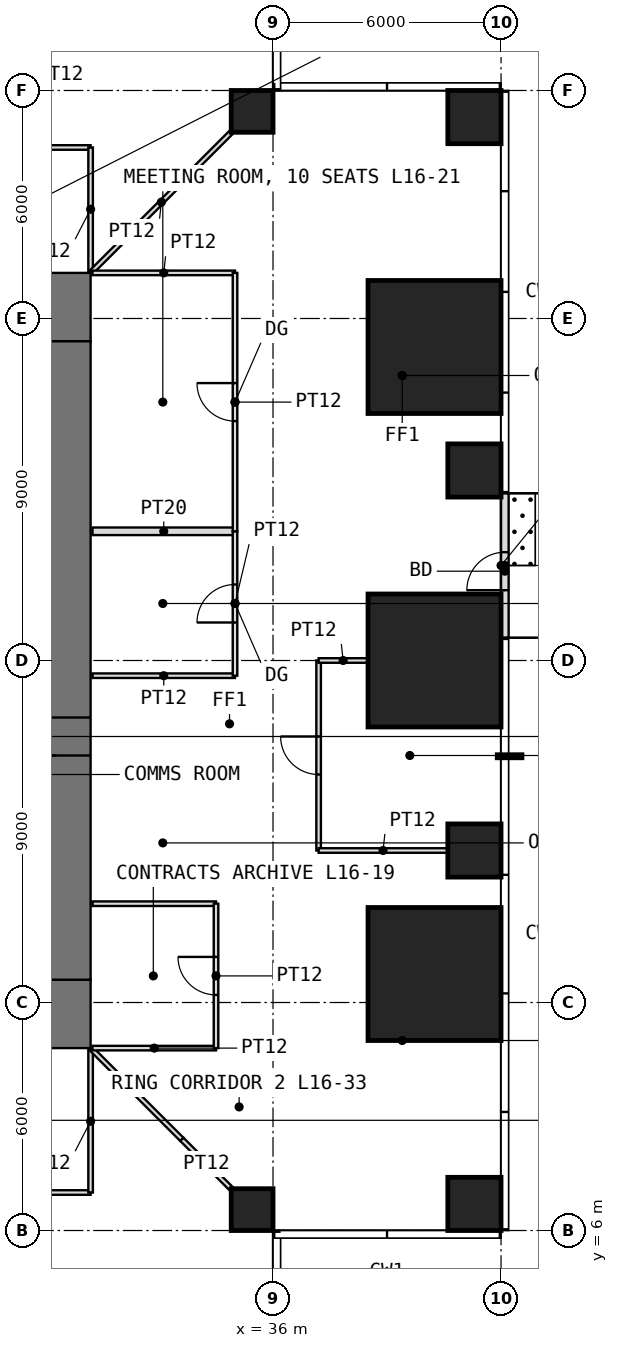
"""IFC4 building model, lengths in metres.
Left out: names, types, materials, properties, quantities, classifications, styles, units other than length and angle.
Written with IfcOpenShell. Run it as: python <this file> out.ifc"""

import sys

from ifc_helpers import new_model, si_unit, direction, frame, frame_2d, origin, origin_2d, place, context, subcontext, project, spatial, rectangle, extrude, element, fill, save


model = new_model("IFC4")
c1 = context("Model", 3, precision=1e-05, world=origin(), true_north=direction((0.0, 1.0)))
c2 = subcontext(c1, "Body", "Model", "MODEL_VIEW")
j1 = project(units=[si_unit("LENGTHUNIT", "METRE"), si_unit("PLANEANGLEUNIT", "RADIAN")], contexts=[c1])
p1 = place(None, origin())
s1 = spatial("IfcSite", under=j1, at=p1, CompositionType="ELEMENT")
p2 = place(p1, origin())
s2 = spatial("IfcBuilding", under=s1, at=p2, CompositionType="ELEMENT")
p3 = place(p2, frame((0.0, 0.0, 70.5)))
s3 = spatial("IfcBuildingStorey", under=s2, at=p3, CompositionType="ELEMENT", Elevation=70.5)
p4 = place(p3, frame((35.45, 6.55, 0.0), z_axis=(0.0, 0.0, 1.0), x_axis=(1.0, 0.0, 0.0)))
e1 = element("IfcColumn", 1, at=p4, inside=s3, PredefinedType="COLUMN", context=c2, shape_type="SweptSolid", body=[
    extrude(rectangle(XDim=1.1, YDim=1.1, at=origin_2d()), origin(), (0.0, 0.0, 1.0), 4.0),
])
p5 = place(p3, frame((41.3, 6.7, 0.0), z_axis=(0.0, 0.0, 1.0), x_axis=(1.0, 0.0, 0.0)))
e2 = element("IfcColumn", 2, at=p5, inside=s3, PredefinedType="COLUMN", context=c2, shape_type="SweptSolid", body=[
    extrude(rectangle(XDim=1.4, YDim=1.4, at=origin_2d()), origin(), (0.0, 0.0, 1.0), 4.0),
])
p6 = place(p3, frame((40.25, 12.75, 0.0), z_axis=(0.0, 0.0, 1.0), x_axis=(1.0, 0.0, 0.0)))
e3 = element("IfcColumn", 3, at=p6, inside=s3, PredefinedType="COLUMN", context=c2, shape_type="SweptSolid", body=[
    extrude(rectangle(XDim=3.5, YDim=3.5, at=origin_2d()), origin(), (0.0, 0.0, 1.0), 4.0),
])
p7 = place(p3, frame((41.3, 16.0, 0.0), z_axis=(0.0, 0.0, 1.0), x_axis=(1.0, 0.0, 0.0)))
e4 = element("IfcColumn", 4, at=p7, inside=s3, PredefinedType="COLUMN", context=c2, shape_type="SweptSolid", body=[
    extrude(rectangle(XDim=1.4, YDim=1.4, at=origin_2d()), origin(), (0.0, 0.0, 1.0), 4.0),
])
p8 = place(p3, frame((40.25, 21.0, 0.0), z_axis=(0.0, 0.0, 1.0), x_axis=(1.0, 0.0, 0.0)))
e5 = element("IfcColumn", 5, at=p8, inside=s3, PredefinedType="COLUMN", context=c2, shape_type="SweptSolid", body=[
    extrude(rectangle(XDim=3.5, YDim=3.5, at=origin_2d()), origin(), (0.0, 0.0, 1.0), 4.0),
])
p9 = place(p3, frame((41.3, 26.0, 0.0), z_axis=(0.0, 0.0, 1.0), x_axis=(1.0, 0.0, 0.0)))
e6 = element("IfcColumn", 6, at=p9, inside=s3, PredefinedType="COLUMN", context=c2, shape_type="SweptSolid", body=[
    extrude(rectangle(XDim=1.4, YDim=1.4, at=origin_2d()), origin(), (0.0, 0.0, 1.0), 4.0),
])
p10 = place(p3, frame((40.25, 29.25, 0.0), z_axis=(0.0, 0.0, 1.0), x_axis=(1.0, 0.0, 0.0)))
e7 = element("IfcColumn", 7, at=p10, inside=s3, PredefinedType="COLUMN", context=c2, shape_type="SweptSolid", body=[
    extrude(rectangle(XDim=3.5, YDim=3.5, at=origin_2d()), origin(), (0.0, 0.0, 1.0), 4.0),
])
p11 = place(p3, frame((35.45, 35.45, 0.0), z_axis=(0.0, 0.0, 1.0), x_axis=(1.0, 0.0, 0.0)))
e8 = element("IfcColumn", 8, at=p11, inside=s3, PredefinedType="COLUMN", context=c2, shape_type="SweptSolid", body=[
    extrude(rectangle(XDim=1.1, YDim=1.1, at=origin_2d()), origin(), (0.0, 0.0, 1.0), 4.0),
])
p12 = place(p3, frame((41.3, 35.3, 0.0), z_axis=(0.0, 0.0, 1.0), x_axis=(1.0, 0.0, 0.0)))
e9 = element("IfcColumn", 9, at=p12, inside=s3, PredefinedType="COLUMN", context=c2, shape_type="SweptSolid", body=[
    extrude(rectangle(XDim=1.4, YDim=1.4, at=origin_2d()), origin(), (0.0, 0.0, 1.0), 4.0),
])
p13 = place(p3, frame((42.1, 21.6, 0.0), z_axis=(0.0, 0.0, 1.0), x_axis=(0.0, 1.0, 0.0)))
e10 = element("IfcWall", 10, at=p13, inside=s3, PredefinedType="USERDEFINED", context=c2, shape_type="SweptSolid", body=[
    extrude(rectangle(XDim=3.8, YDim=0.2, at=frame_2d((1.9, 0.0))), origin(), (0.0, 0.0, 1.0), 3.75),
])
p14 = place(p13, frame((1.25, 0.0, 0.0)))
e11 = element("IfcOpeningElement", 11, at=p14, cuts=e10, PredefinedType="OPENING", context=c2, shape_type="SweptSolid", body=[
    extrude(rectangle(XDim=1.0, YDim=2.4, at=frame_2d((0.5, 1.2))), frame((0.0, 0.11, 0.0), z_axis=(0.0, -1.0, 0.0), x_axis=(1.0, 0.0, 0.0)), (0.0, 0.0, 1.0), 0.22),
])
p15 = place(p3, frame((10.8, 11.7, -0.05), z_axis=(0.0, 0.0, 1.0), x_axis=(1.0, 0.0, 0.0)))
e12 = element("IfcWall", 12, at=p15, inside=s3, PredefinedType="SHEAR", context=c2, shape_type="SweptSolid", body=[
    extrude(rectangle(XDim=20.4, YDim=1.8, at=frame_2d((10.2, 0.0))), origin(), (0.0, 0.0, 1.0), 4.0),
])
p16 = place(p15, frame((9.2, 0.0, 0.05)))
e13 = element("IfcOpeningElement", 13, at=p16, cuts=e12, PredefinedType="OPENING", context=c2, shape_type="SweptSolid", body=[
    extrude(rectangle(XDim=2.0, YDim=2.2, at=frame_2d((1.0, 1.1))), frame((0.0, 0.91, 0.0), z_axis=(0.0, -1.0, 0.0), x_axis=(1.0, 0.0, 0.0)), (0.0, 0.0, 1.0), 1.82),
])
p17 = place(p3, frame((10.8, 30.3, -0.05), z_axis=(0.0, 0.0, 1.0), x_axis=(1.0, 0.0, 0.0)))
e14 = element("IfcWall", 14, at=p17, inside=s3, PredefinedType="SHEAR", context=c2, shape_type="SweptSolid", body=[
    extrude(rectangle(XDim=20.4, YDim=1.8, at=frame_2d((10.2, 0.0))), origin(), (0.0, 0.0, 1.0), 4.0),
])
p18 = place(p17, frame((9.2, 0.0, 0.05)))
e15 = element("IfcOpeningElement", 15, at=p18, cuts=e14, PredefinedType="OPENING", context=c2, shape_type="SweptSolid", body=[
    extrude(rectangle(XDim=2.0, YDim=2.2, at=frame_2d((1.0, 1.1))), frame((0.0, 0.91, 0.0), z_axis=(0.0, -1.0, 0.0), x_axis=(1.0, 0.0, 0.0)), (0.0, 0.0, 1.0), 1.82),
])
p19 = place(p3, frame((30.3, 12.6, -0.05), z_axis=(0.0, 0.0, 1.0), x_axis=(0.0, 1.0, 0.0)))
e16 = element("IfcWall", 16, at=p19, inside=s3, PredefinedType="SHEAR", context=c2, shape_type="SweptSolid", body=[
    extrude(rectangle(XDim=16.8, YDim=1.8, at=frame_2d((8.4, 0.0))), origin(), (0.0, 0.0, 1.0), 4.0),
])
p20 = place(p19, frame((5.9, 0.0, 0.05)))
e17 = element("IfcOpeningElement", 17, at=p20, cuts=e16, PredefinedType="OPENING", context=c2, shape_type="SweptSolid", body=[
    extrude(rectangle(XDim=1.0, YDim=2.2, at=frame_2d((0.5, 1.1))), frame((0.0, 0.91, 0.0), z_axis=(0.0, -1.0, 0.0), x_axis=(1.0, 0.0, 0.0)), (0.0, 0.0, 1.0), 1.82),
])
p21 = place(p3, frame((23.6, 7.0, 0.0), z_axis=(0.0, 0.0, 1.0), x_axis=(1.0, 0.0, 0.0)))
e18 = element("IfcWall", 18, at=p21, inside=s3, PredefinedType="PARTITIONING", context=c2, shape_type="SweptSolid", body=[
    extrude(rectangle(XDim=7.6, YDim=0.12, at=frame_2d((3.8, 0.0))), origin(), (0.0, 0.0, 1.0), 3.75),
])
p22 = place(p21, frame((3.3, 0.0, 0.0)))
e19 = element("IfcOpeningElement", 19, at=p22, cuts=e18, PredefinedType="OPENING", context=c2, shape_type="SweptSolid", body=[
    extrude(rectangle(XDim=1.0, YDim=2.4, at=frame_2d((0.5, 1.2))), frame((0.0, 0.07, 0.0), z_axis=(0.0, -1.0, 0.0), x_axis=(1.0, 0.0, 0.0)), (0.0, 0.0, 1.0), 0.14),
])
p23 = place(p3, frame((27.4, 34.5, 0.0), z_axis=(0.0, 0.0, 1.0), x_axis=(1.0, 0.0, 0.0)))
e20 = element("IfcWall", 20, at=p23, inside=s3, PredefinedType="PARTITIONING", context=c2, shape_type="SweptSolid", body=[
    extrude(rectangle(XDim=3.8, YDim=0.12, at=frame_2d((1.9, 0.0))), origin(), (0.0, 0.0, 1.0), 3.75),
])
p24 = place(p23, frame((1.4, 0.0, 0.0)))
e21 = element("IfcOpeningElement", 21, at=p24, cuts=e20, PredefinedType="OPENING", context=c2, shape_type="SweptSolid", body=[
    extrude(rectangle(XDim=1.0, YDim=2.2, at=frame_2d((0.5, 1.1))), frame((0.0, 0.07, 0.0), z_axis=(0.0, -1.0, 0.0), x_axis=(1.0, 0.0, 0.0)), (0.0, 0.0, 1.0), 0.14),
])
p25 = place(p3, frame((31.2, 7.0, 0.0), z_axis=(0.0, 0.0, 1.0), x_axis=(0.0, 1.0, 0.0)))
e22 = element("IfcWall", 22, at=p25, inside=s3, PredefinedType="PARTITIONING", context=c2, shape_type="SweptSolid", body=[
    extrude(rectangle(XDim=3.75, YDim=0.12, at=frame_2d((1.875, 0.0))), origin(), (0.0, 0.0, 1.0), 3.75),
])
p26 = place(p3, frame((31.2, 31.25, 0.0), z_axis=(0.0, 0.0, 1.0), x_axis=(0.0, 1.0, 0.0)))
e23 = element("IfcWall", 23, at=p26, inside=s3, PredefinedType="PARTITIONING", context=c2, shape_type="SweptSolid", body=[
    extrude(rectangle(XDim=3.25, YDim=0.12, at=frame_2d((1.625, 0.0))), origin(), (0.0, 0.0, 1.0), 3.75),
])
p27 = place(p3, frame((31.235, 10.765, 0.0), z_axis=(0.0, 0.0, 1.0), x_axis=(0.707106781187, -0.707106781187, 0.0)))
e24 = element("IfcWall", 24, at=p27, inside=s3, PredefinedType="PARTITIONING", context=c2, shape_type="SweptSolid", body=[
    extrude(rectangle(XDim=3.346, YDim=0.12, at=frame_2d((1.673, 0.0))), origin(), (0.0, 0.0, 1.0), 3.75),
])
p28 = place(p3, frame((31.235, 31.235, 0.0), z_axis=(0.0, 0.0, 1.0), x_axis=(0.707106781187, 0.707106781187, 0.0)))
e25 = element("IfcWall", 25, at=p28, inside=s3, PredefinedType="PARTITIONING", context=c2, shape_type="SweptSolid", body=[
    extrude(rectangle(XDim=5.168, YDim=0.12, at=frame_2d((2.584, 0.0))), origin(), (0.0, 0.0, 1.0), 3.75),
])
for number, where, z_axis, x_axis in (
    (26, (31.25, 10.8, 0.0), (0.0, 0.0, 1.0), (1.0, 0.0, 0.0)),
    (27, (31.25, 14.6, 0.0), (0.0, 0.0, 1.0), (1.0, 0.0, 0.0)),
):
    element("IfcWall", number, at=place(p3, frame(where, z_axis=z_axis, x_axis=x_axis)), inside=s3, PredefinedType="PARTITIONING", context=c2, shape_type="SweptSolid", body=[
        extrude(rectangle(XDim=3.25, YDim=0.12, at=frame_2d((1.625, 0.0))), origin(), (0.0, 0.0, 1.0), 3.75),
    ])
p29 = place(p3, frame((31.25, 20.6, 0.0), z_axis=(0.0, 0.0, 1.0), x_axis=(1.0, 0.0, 0.0)))
e28 = element("IfcWall", 28, at=p29, inside=s3, PredefinedType="PARTITIONING", context=c2, shape_type="SweptSolid", body=[
    extrude(rectangle(XDim=3.75, YDim=0.12, at=frame_2d((1.875, 0.0))), origin(), (0.0, 0.0, 1.0), 3.75),
])
p30 = place(p3, frame((31.25, 24.4, 0.0), z_axis=(0.0, 0.0, 1.0), x_axis=(1.0, 0.0, 0.0)))
e29 = element("IfcWall", 29, at=p30, inside=s3, PredefinedType="PARTITIONING", context=c2, shape_type="SweptSolid", body=[
    extrude(rectangle(XDim=3.75, YDim=0.2, at=frame_2d((1.875, 0.0))), origin(), (0.0, 0.0, 1.0), 3.75),
])
p31 = place(p3, frame((31.25, 31.2, 0.0), z_axis=(0.0, 0.0, 1.0), x_axis=(1.0, 0.0, 0.0)))
e30 = element("IfcWall", 30, at=p31, inside=s3, PredefinedType="PARTITIONING", context=c2, shape_type="SweptSolid", body=[
    extrude(rectangle(XDim=3.75, YDim=0.12, at=frame_2d((1.875, 0.0))), origin(), (0.0, 0.0, 1.0), 3.75),
])
p32 = place(p3, frame((33.602, 8.398, 0.0), z_axis=(0.0, 0.0, 1.0), x_axis=(0.707106781187, -0.707106781187, 0.0)))
e31 = element("IfcWall", 31, at=p32, inside=s3, PredefinedType="PARTITIONING", context=c2, shape_type="SweptSolid", body=[
    extrude(rectangle(XDim=1.822, YDim=0.12, at=frame_2d((0.911, 0.0))), origin(), (0.0, 0.0, 1.0), 3.75),
])
p33 = place(p3, frame((34.5, 10.8, 0.0), z_axis=(0.0, 0.0, 1.0), x_axis=(0.0, 1.0, 0.0)))
e32 = element("IfcWall", 32, at=p33, inside=s3, PredefinedType="PARTITIONING", context=c2, shape_type="SweptSolid", body=[
    extrude(rectangle(XDim=3.8, YDim=0.12, at=frame_2d((1.9, 0.0))), origin(), (0.0, 0.0, 1.0), 3.75),
])
p34 = place(p33, frame((1.4, 0.0, 0.0)))
e33 = element("IfcOpeningElement", 33, at=p34, cuts=e32, PredefinedType="OPENING", context=c2, shape_type="SweptSolid", body=[
    extrude(rectangle(XDim=1.0, YDim=2.2, at=frame_2d((0.5, 1.1))), frame((0.0, 0.07, 0.0), z_axis=(0.0, -1.0, 0.0), x_axis=(1.0, 0.0, 0.0)), (0.0, 0.0, 1.0), 0.14),
])
p35 = place(p3, frame((35.0, 20.6, 0.0), z_axis=(0.0, 0.0, 1.0), x_axis=(0.0, 1.0, 0.0)))
e34 = element("IfcWall", 34, at=p35, inside=s3, PredefinedType="PARTITIONING", context=c2, shape_type="SweptSolid", body=[
    extrude(rectangle(XDim=3.8, YDim=0.12, at=frame_2d((1.9, 0.0))), origin(), (0.0, 0.0, 1.0), 3.75),
])
p36 = place(p35, frame((1.4, 0.0, 0.0)))
e35 = element("IfcOpeningElement", 35, at=p36, cuts=e34, PredefinedType="OPENING", context=c2, shape_type="SweptSolid", body=[
    extrude(rectangle(XDim=1.0, YDim=2.4, at=frame_2d((0.5, 1.2))), frame((0.0, 0.07, 0.0), z_axis=(0.0, -1.0, 0.0), x_axis=(1.0, 0.0, 0.0)), (0.0, 0.0, 1.0), 0.14),
])
p37 = place(p3, frame((35.0, 24.4, 0.0), z_axis=(0.0, 0.0, 1.0), x_axis=(0.0, 1.0, 0.0)))
e36 = element("IfcWall", 36, at=p37, inside=s3, PredefinedType="PARTITIONING", context=c2, shape_type="SweptSolid", body=[
    extrude(rectangle(XDim=6.8, YDim=0.12, at=frame_2d((3.4, 0.0))), origin(), (0.0, 0.0, 1.0), 3.75),
])
p38 = place(p37, frame((2.9, 0.0, 0.0)))
e37 = element("IfcOpeningElement", 37, at=p38, cuts=e36, PredefinedType="OPENING", context=c2, shape_type="SweptSolid", body=[
    extrude(rectangle(XDim=1.0, YDim=2.4, at=frame_2d((0.5, 1.2))), frame((0.0, 0.07, 0.0), z_axis=(0.0, -1.0, 0.0), x_axis=(1.0, 0.0, 0.0)), (0.0, 0.0, 1.0), 0.14),
])
p39 = place(p3, frame((37.2, 16.0, 0.0), z_axis=(0.0, 0.0, 1.0), x_axis=(0.0, 1.0, 0.0)))
e38 = element("IfcWall", 38, at=p39, inside=s3, PredefinedType="PARTITIONING", context=c2, shape_type="SweptSolid", body=[
    extrude(rectangle(XDim=5.0, YDim=0.12, at=frame_2d((2.5, 0.0))), origin(), (0.0, 0.0, 1.0), 3.75),
])
p40 = place(p39, frame((2.0, 0.0, 0.0)))
e39 = element("IfcOpeningElement", 39, at=p40, cuts=e38, PredefinedType="OPENING", context=c2, shape_type="SweptSolid", body=[
    extrude(rectangle(XDim=1.0, YDim=2.2, at=frame_2d((0.5, 1.1))), frame((0.0, 0.07, 0.0), z_axis=(0.0, -1.0, 0.0), x_axis=(1.0, 0.0, 0.0)), (0.0, 0.0, 1.0), 0.14),
])
p41 = place(p3, frame((37.2, 16.0, 0.0), z_axis=(0.0, 0.0, 1.0), x_axis=(1.0, 0.0, 0.0)))
e40 = element("IfcWall", 40, at=p41, inside=s3, PredefinedType="PARTITIONING", context=c2, shape_type="SweptSolid", body=[
    extrude(rectangle(XDim=3.39, YDim=0.12, at=frame_2d((1.695, 0.0))), origin(), (0.0, 0.0, 1.0), 3.75),
])
p42 = place(p3, frame((37.2, 21.0, 0.0), z_axis=(0.0, 0.0, 1.0), x_axis=(1.0, 0.0, 0.0)))
e41 = element("IfcWall", 41, at=p42, inside=s3, PredefinedType="PARTITIONING", context=c2, shape_type="SweptSolid", body=[
    extrude(rectangle(XDim=1.29, YDim=0.12, at=frame_2d((0.645, 0.0))), origin(), (0.0, 0.0, 1.0), 3.75),
])
p43 = place(p14, origin())
e42 = element("IfcDoor", 42, at=p43, inside=s3, OperationType="SINGLE_SWING_LEFT", PredefinedType="DOOR", context=c2, shape_type="SweptSolid", body=[
    extrude(rectangle(XDim=1.0, YDim=2.4, at=frame_2d((0.5, 1.2))), frame((0.0, 0.025, 0.0), z_axis=(0.0, -1.0, 0.0), x_axis=(1.0, 0.0, 0.0)), (0.0, 0.0, 1.0), 0.05),
])
fill(e11, e42)
p44 = place(p20, origin())
e43 = element("IfcDoor", 43, at=p44, inside=s3, OperationType="SINGLE_SWING_LEFT", PredefinedType="DOOR", context=c2, shape_type="SweptSolid", body=[
    extrude(rectangle(XDim=1.0, YDim=2.2, at=frame_2d((0.5, 1.1))), frame((0.0, 0.025, 0.0), z_axis=(0.0, -1.0, 0.0), x_axis=(1.0, 0.0, 0.0)), (0.0, 0.0, 1.0), 0.05),
])
fill(e17, e43)
p45 = place(p34, origin())
e44 = element("IfcDoor", 44, at=p45, inside=s3, OperationType="SINGLE_SWING_RIGHT", PredefinedType="DOOR", context=c2, shape_type="SweptSolid", body=[
    extrude(rectangle(XDim=1.0, YDim=2.2, at=frame_2d((0.5, 1.1))), frame((0.0, 0.025, 0.0), z_axis=(0.0, -1.0, 0.0), x_axis=(1.0, 0.0, 0.0)), (0.0, 0.0, 1.0), 0.05),
])
fill(e33, e44)
p46 = place(p36, origin())
e45 = element("IfcDoor", 45, at=p46, inside=s3, OperationType="SINGLE_SWING_LEFT", PredefinedType="DOOR", context=c2, shape_type="SweptSolid", body=[
    extrude(rectangle(XDim=1.0, YDim=2.4, at=frame_2d((0.5, 1.2))), frame((0.0, 0.025, 0.0), z_axis=(0.0, -1.0, 0.0), x_axis=(1.0, 0.0, 0.0)), (0.0, 0.0, 1.0), 0.05),
])
fill(e35, e45)
p47 = place(p38, origin())
e46 = element("IfcDoor", 46, at=p47, inside=s3, OperationType="SINGLE_SWING_RIGHT", PredefinedType="DOOR", context=c2, shape_type="SweptSolid", body=[
    extrude(rectangle(XDim=1.0, YDim=2.4, at=frame_2d((0.5, 1.2))), frame((0.0, 0.025, 0.0), z_axis=(0.0, -1.0, 0.0), x_axis=(1.0, 0.0, 0.0)), (0.0, 0.0, 1.0), 0.05),
])
fill(e37, e46)
p48 = place(p40, origin())
e47 = element("IfcDoor", 47, at=p48, inside=s3, OperationType="SINGLE_SWING_RIGHT", PredefinedType="DOOR", context=c2, shape_type="SweptSolid", body=[
    extrude(rectangle(XDim=1.0, YDim=2.2, at=frame_2d((0.5, 1.1))), frame((0.0, 0.025, 0.0), z_axis=(0.0, -1.0, 0.0), x_axis=(1.0, 0.0, 0.0)), (0.0, 0.0, 1.0), 0.05),
])
fill(e39, e47)
save(model, sys.argv[1])
